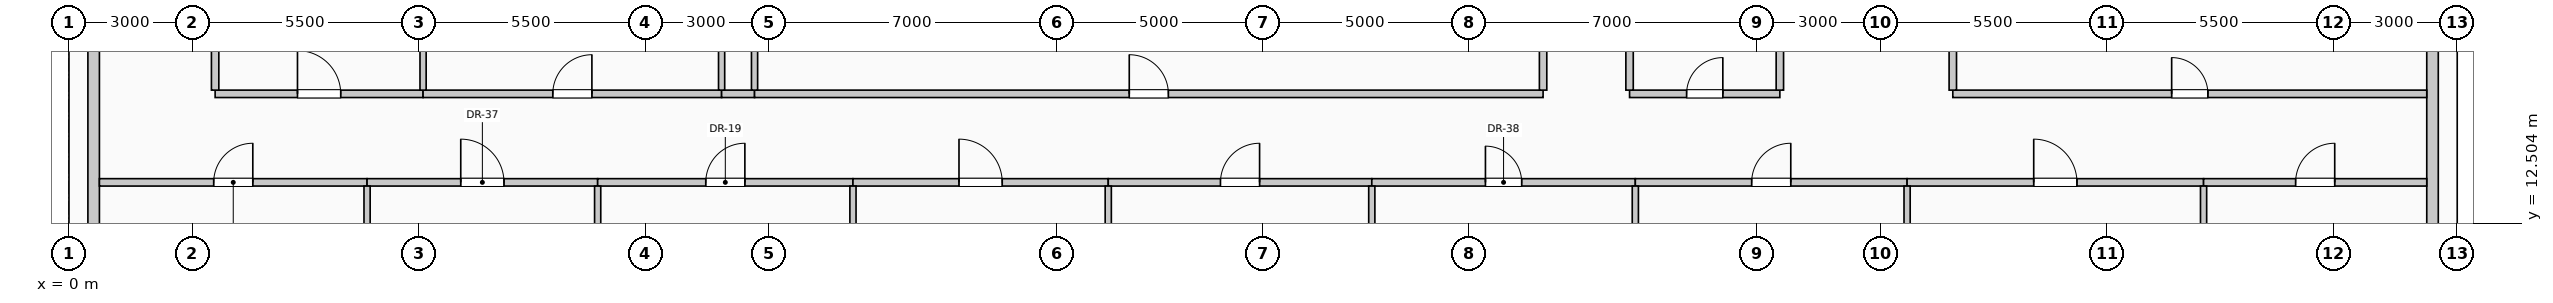
"""IFC4 building model, lengths in metres.
Left out: names, types, materials, properties, quantities, classifications, styles, units other than length and angle.
Written with IfcOpenShell. Run it as: python <this file> out.ifc"""

import sys

from ifc_helpers import new_model, si_unit, direction, frame, frame_2d, origin, place, context, subcontext, project, spatial, rectangle, extrude, element, fill, save


model = new_model("IFC4")
c1 = context("Model", 3, precision=1e-05, world=origin(), true_north=direction((0.0, 1.0)))
c2 = subcontext(c1, "Body", "Model", "MODEL_VIEW")
j1 = project(units=[si_unit("LENGTHUNIT", "METRE"), si_unit("PLANEANGLEUNIT", "RADIAN")], contexts=[c1])
p1 = place(None, origin())
s1 = spatial("IfcSite", under=j1, at=p1, CompositionType="ELEMENT")
p2 = place(p1, origin())
s2 = spatial("IfcBuilding", under=s1, at=p2, CompositionType="ELEMENT")
p3 = place(p2, frame((0.0, 0.0, 148.6)))
s3 = spatial("IfcBuildingStorey", under=s2, at=p3, CompositionType="ELEMENT", Elevation=148.6)
for number, where, z_axis, x_axis in (
    (1, (0.6, 10.445, 0.0), (0.0, 0.0, 1.0), (0.0, 1.0, 0.0)),
    (2, (57.4, 17.555, 0.0), (0.0, 0.0, 1.0), (0.0, -1.0, 0.0)),
):
    element("IfcWall", number, at=place(p3, frame(where, z_axis=z_axis, x_axis=x_axis)), inside=s3, PredefinedType="SOLIDWALL", context=c2, shape_type="SweptSolid", body=[
        extrude(rectangle(XDim=7.11, YDim=0.28, at=frame_2d((3.555, 0.0))), origin(), (0.0, 0.0, 1.0), 2.875),
    ])
p4 = place(p3, frame((0.74, 13.5, 0.0), z_axis=(0.0, 0.0, 1.0), x_axis=(1.0, 0.0, 0.0)))
e3 = element("IfcWall", 3, at=p4, inside=s3, PredefinedType="PARTITIONING", context=c2, shape_type="SweptSolid", body=[
    extrude(rectangle(XDim=6.5, YDim=0.18, at=frame_2d((3.25, 0.0))), origin(), (0.0, 0.0, 1.0), 3.725),
])
p5 = place(p4, frame((2.775, 0.0, 0.0)))
e4 = element("IfcOpeningElement", 4, at=p5, cuts=e3, PredefinedType="OPENING", context=c2, shape_type="SweptSolid", body=[
    extrude(rectangle(XDim=0.95, YDim=2.15, at=frame_2d((0.475, 1.075))), frame((0.0, 0.1, 0.0), z_axis=(0.0, -1.0, 0.0), x_axis=(1.0, 0.0, 0.0)), (0.0, 0.0, 1.0), 0.2),
])
p6 = place(p3, frame((7.24, 13.5, 0.0), z_axis=(0.0, 0.0, 1.0), x_axis=(1.0, 0.0, 0.0)))
e5 = element("IfcWall", 5, at=p6, inside=s3, PredefinedType="PARTITIONING", context=c2, shape_type="SweptSolid", body=[
    extrude(rectangle(XDim=5.6, YDim=0.18, at=frame_2d((2.8, 0.0))), origin(), (0.0, 0.0, 1.0), 3.725),
])
p7 = place(p6, frame((2.275, 0.0, 0.0)))
e6 = element("IfcOpeningElement", 6, at=p7, cuts=e5, PredefinedType="OPENING", context=c2, shape_type="SweptSolid", body=[
    extrude(rectangle(XDim=1.05, YDim=2.15, at=frame_2d((0.525, 1.075))), frame((0.0, 0.1, 0.0), z_axis=(0.0, -1.0, 0.0), x_axis=(1.0, 0.0, 0.0)), (0.0, 0.0, 1.0), 0.2),
])
p8 = place(p3, frame((12.84, 13.5, 0.0), z_axis=(0.0, 0.0, 1.0), x_axis=(1.0, 0.0, 0.0)))
e7 = element("IfcWall", 7, at=p8, inside=s3, PredefinedType="PARTITIONING", context=c2, shape_type="SweptSolid", body=[
    extrude(rectangle(XDim=6.2, YDim=0.18, at=frame_2d((3.1, 0.0))), origin(), (0.0, 0.0, 1.0), 3.725),
])
p9 = place(p8, frame((2.625, 0.0, 0.0)))
e8 = element("IfcOpeningElement", 8, at=p9, cuts=e7, PredefinedType="OPENING", context=c2, shape_type="SweptSolid", body=[
    extrude(rectangle(XDim=0.95, YDim=2.15, at=frame_2d((0.475, 1.075))), frame((0.0, 0.1, 0.0), z_axis=(0.0, -1.0, 0.0), x_axis=(1.0, 0.0, 0.0)), (0.0, 0.0, 1.0), 0.2),
])
p10 = place(p3, frame((19.04, 13.5, 0.0), z_axis=(0.0, 0.0, 1.0), x_axis=(1.0, 0.0, 0.0)))
e9 = element("IfcWall", 9, at=p10, inside=s3, PredefinedType="PARTITIONING", context=c2, shape_type="SweptSolid", body=[
    extrude(rectangle(XDim=6.2, YDim=0.18, at=frame_2d((3.1, 0.0))), origin(), (0.0, 0.0, 1.0), 3.725),
])
p11 = place(p10, frame((2.575, 0.0, 0.0)))
e10 = element("IfcOpeningElement", 10, at=p11, cuts=e9, PredefinedType="OPENING", context=c2, shape_type="SweptSolid", body=[
    extrude(rectangle(XDim=1.05, YDim=2.15, at=frame_2d((0.525, 1.075))), frame((0.0, 0.1, 0.0), z_axis=(0.0, -1.0, 0.0), x_axis=(1.0, 0.0, 0.0)), (0.0, 0.0, 1.0), 0.2),
])
p12 = place(p3, frame((25.24, 13.5, 0.0), z_axis=(0.0, 0.0, 1.0), x_axis=(1.0, 0.0, 0.0)))
e11 = element("IfcWall", 11, at=p12, inside=s3, PredefinedType="PARTITIONING", context=c2, shape_type="SweptSolid", body=[
    extrude(rectangle(XDim=6.4, YDim=0.18, at=frame_2d((3.2, 0.0))), origin(), (0.0, 0.0, 1.0), 3.725),
])
p13 = place(p12, frame((2.725, 0.0, 0.0)))
e12 = element("IfcOpeningElement", 12, at=p13, cuts=e11, PredefinedType="OPENING", context=c2, shape_type="SweptSolid", body=[
    extrude(rectangle(XDim=0.95, YDim=2.15, at=frame_2d((0.475, 1.075))), frame((0.0, 0.1, 0.0), z_axis=(0.0, -1.0, 0.0), x_axis=(1.0, 0.0, 0.0)), (0.0, 0.0, 1.0), 0.2),
])
p14 = place(p3, frame((31.64, 13.5, 0.0), z_axis=(0.0, 0.0, 1.0), x_axis=(1.0, 0.0, 0.0)))
e13 = element("IfcWall", 13, at=p14, inside=s3, PredefinedType="PARTITIONING", context=c2, shape_type="SweptSolid", body=[
    extrude(rectangle(XDim=6.4, YDim=0.18, at=frame_2d((3.2, 0.0))), origin(), (0.0, 0.0, 1.0), 3.725),
])
p15 = place(p14, frame((2.76, 0.0, 0.0)))
e14 = element("IfcOpeningElement", 14, at=p15, cuts=e13, PredefinedType="OPENING", context=c2, shape_type="SweptSolid", body=[
    extrude(rectangle(XDim=0.88, YDim=2.1, at=frame_2d((0.44, 1.05))), frame((0.0, 0.1, 0.0), z_axis=(0.0, -1.0, 0.0), x_axis=(1.0, 0.0, 0.0)), (0.0, 0.0, 1.0), 0.2),
])
p16 = place(p3, frame((38.04, 13.5, 0.0), z_axis=(0.0, 0.0, 1.0), x_axis=(1.0, 0.0, 0.0)))
e15 = element("IfcWall", 15, at=p16, inside=s3, PredefinedType="PARTITIONING", context=c2, shape_type="SweptSolid", body=[
    extrude(rectangle(XDim=6.6, YDim=0.18, at=frame_2d((3.3, 0.0))), origin(), (0.0, 0.0, 1.0), 3.725),
])
p17 = place(p16, frame((2.825, 0.0, 0.0)))
e16 = element("IfcOpeningElement", 16, at=p17, cuts=e15, PredefinedType="OPENING", context=c2, shape_type="SweptSolid", body=[
    extrude(rectangle(XDim=0.95, YDim=2.15, at=frame_2d((0.475, 1.075))), frame((0.0, 0.1, 0.0), z_axis=(0.0, -1.0, 0.0), x_axis=(1.0, 0.0, 0.0)), (0.0, 0.0, 1.0), 0.2),
])
p18 = place(p3, frame((44.64, 13.5, 0.0), z_axis=(0.0, 0.0, 1.0), x_axis=(1.0, 0.0, 0.0)))
e17 = element("IfcWall", 17, at=p18, inside=s3, PredefinedType="PARTITIONING", context=c2, shape_type="SweptSolid", body=[
    extrude(rectangle(XDim=7.2, YDim=0.18, at=frame_2d((3.6, 0.0))), origin(), (0.0, 0.0, 1.0), 3.725),
])
p19 = place(p18, frame((3.075, 0.0, 0.0)))
e18 = element("IfcOpeningElement", 18, at=p19, cuts=e17, PredefinedType="OPENING", context=c2, shape_type="SweptSolid", body=[
    extrude(rectangle(XDim=1.05, YDim=2.15, at=frame_2d((0.525, 1.075))), frame((0.0, 0.1, 0.0), z_axis=(0.0, -1.0, 0.0), x_axis=(1.0, 0.0, 0.0)), (0.0, 0.0, 1.0), 0.2),
])
p20 = place(p3, frame((51.84, 13.5, 0.0), z_axis=(0.0, 0.0, 1.0), x_axis=(1.0, 0.0, 0.0)))
e19 = element("IfcWall", 19, at=p20, inside=s3, PredefinedType="PARTITIONING", context=c2, shape_type="SweptSolid", body=[
    extrude(rectangle(XDim=5.42, YDim=0.18, at=frame_2d((2.71, 0.0))), origin(), (0.0, 0.0, 1.0), 3.725),
])
p21 = place(p20, frame((2.235, 0.0, 0.0)))
e20 = element("IfcOpeningElement", 20, at=p21, cuts=e19, PredefinedType="OPENING", context=c2, shape_type="SweptSolid", body=[
    extrude(rectangle(XDim=0.95, YDim=2.15, at=frame_2d((0.475, 1.075))), frame((0.0, 0.1, 0.0), z_axis=(0.0, -1.0, 0.0), x_axis=(1.0, 0.0, 0.0)), (0.0, 0.0, 1.0), 0.2),
])
p22 = place(p3, frame((3.55, 15.65, 0.0), z_axis=(0.0, 0.0, 1.0), x_axis=(1.0, 0.0, 0.0)))
e21 = element("IfcWall", 21, at=p22, inside=s3, PredefinedType="PARTITIONING", context=c2, shape_type="SweptSolid", body=[
    extrude(rectangle(XDim=5.05, YDim=0.18, at=frame_2d((2.525, 0.0))), origin(), (0.0, 0.0, 1.0), 3.725),
])
p23 = place(p22, frame((2.0, 0.0, 0.0)))
e22 = element("IfcOpeningElement", 22, at=p23, cuts=e21, PredefinedType="OPENING", context=c2, shape_type="SweptSolid", body=[
    extrude(rectangle(XDim=1.05, YDim=2.15, at=frame_2d((0.525, 1.075))), frame((0.0, 0.1, 0.0), z_axis=(0.0, -1.0, 0.0), x_axis=(1.0, 0.0, 0.0)), (0.0, 0.0, 1.0), 0.2),
])
p24 = place(p3, frame((8.6, 15.65, 0.0), z_axis=(0.0, 0.0, 1.0), x_axis=(1.0, 0.0, 0.0)))
e23 = element("IfcWall", 23, at=p24, inside=s3, PredefinedType="PARTITIONING", context=c2, shape_type="SweptSolid", body=[
    extrude(rectangle(XDim=7.25, YDim=0.18, at=frame_2d((3.625, 0.0))), origin(), (0.0, 0.0, 1.0), 3.725),
])
p25 = place(p24, frame((3.15, 0.0, 0.0)))
e24 = element("IfcOpeningElement", 24, at=p25, cuts=e23, PredefinedType="OPENING", context=c2, shape_type="SweptSolid", body=[
    extrude(rectangle(XDim=0.95, YDim=2.15, at=frame_2d((0.475, 1.075))), frame((0.0, 0.1, 0.0), z_axis=(0.0, -1.0, 0.0), x_axis=(1.0, 0.0, 0.0)), (0.0, 0.0, 1.0), 0.2),
])
p26 = place(p3, frame((15.85, 15.65, 0.0), z_axis=(0.0, 0.0, 1.0), x_axis=(1.0, 0.0, 0.0)))
e25 = element("IfcWall", 25, at=p26, inside=s3, PredefinedType="PARTITIONING", context=c2, shape_type="SweptSolid", body=[
    extrude(rectangle(XDim=0.8, YDim=0.18, at=frame_2d((0.4, 0.0))), origin(), (0.0, 0.0, 1.0), 3.725),
])
p27 = place(p3, frame((16.65, 15.65, 0.0), z_axis=(0.0, 0.0, 1.0), x_axis=(1.0, 0.0, 0.0)))
e26 = element("IfcWall", 26, at=p27, inside=s3, PredefinedType="PARTITIONING", context=c2, shape_type="SweptSolid", body=[
    extrude(rectangle(XDim=19.15, YDim=0.18, at=frame_2d((9.575, 0.0))), origin(), (0.0, 0.0, 1.0), 3.725),
])
p28 = place(p27, frame((9.1, 0.0, 0.0)))
e27 = element("IfcOpeningElement", 27, at=p28, cuts=e26, PredefinedType="OPENING", context=c2, shape_type="SweptSolid", body=[
    extrude(rectangle(XDim=0.95, YDim=2.15, at=frame_2d((0.475, 1.075))), frame((0.0, 0.1, 0.0), z_axis=(0.0, -1.0, 0.0), x_axis=(1.0, 0.0, 0.0)), (0.0, 0.0, 1.0), 0.2),
])
p29 = place(p3, frame((37.9, 15.65, 0.0), z_axis=(0.0, 0.0, 1.0), x_axis=(1.0, 0.0, 0.0)))
e28 = element("IfcWall", 28, at=p29, inside=s3, PredefinedType="PARTITIONING", context=c2, shape_type="SweptSolid", body=[
    extrude(rectangle(XDim=3.65, YDim=0.18, at=frame_2d((1.825, 0.0))), origin(), (0.0, 0.0, 1.0), 3.725),
])
p30 = place(p29, frame((1.385, 0.0, 0.0)))
e29 = element("IfcOpeningElement", 29, at=p30, cuts=e28, PredefinedType="OPENING", context=c2, shape_type="SweptSolid", body=[
    extrude(rectangle(XDim=0.88, YDim=2.1, at=frame_2d((0.44, 1.05))), frame((0.0, 0.1, 0.0), z_axis=(0.0, -1.0, 0.0), x_axis=(1.0, 0.0, 0.0)), (0.0, 0.0, 1.0), 0.2),
])
p31 = place(p3, frame((45.75, 15.65, 0.0), z_axis=(0.0, 0.0, 1.0), x_axis=(1.0, 0.0, 0.0)))
e30 = element("IfcWall", 30, at=p31, inside=s3, PredefinedType="PARTITIONING", context=c2, shape_type="SweptSolid", body=[
    extrude(rectangle(XDim=11.51, YDim=0.18, at=frame_2d((5.755, 0.0))), origin(), (0.0, 0.0, 1.0), 3.725),
])
p32 = place(p31, frame((5.315, 0.0, 0.0)))
e31 = element("IfcOpeningElement", 31, at=p32, cuts=e30, PredefinedType="OPENING", context=c2, shape_type="SweptSolid", body=[
    extrude(rectangle(XDim=0.88, YDim=2.1, at=frame_2d((0.44, 1.05))), frame((0.0, 0.1, 0.0), z_axis=(0.0, -1.0, 0.0), x_axis=(1.0, 0.0, 0.0)), (0.0, 0.0, 1.0), 0.2),
])
p33 = place(p3, frame((3.55, 15.74, 0.0), z_axis=(0.0, 0.0, 1.0), x_axis=(0.0, 1.0, 0.0)))
e32 = element("IfcWall", 32, at=p33, inside=s3, PredefinedType="PARTITIONING", context=c2, shape_type="SweptSolid", body=[
    extrude(rectangle(XDim=3.135, YDim=0.18, at=frame_2d((1.567, 0.0))), origin(), (0.0, 0.0, 1.0), 3.725),
])
p34 = place(p3, frame((7.24, 0.74, 0.0), z_axis=(0.0, 0.0, 1.0), x_axis=(0.0, 1.0, 0.0)))
e33 = element("IfcWall", 33, at=p34, inside=s3, PredefinedType="PARTITIONING", context=c2, shape_type="SweptSolid", body=[
    extrude(rectangle(XDim=12.67, YDim=0.15, at=frame_2d((6.335, 0.0))), origin(), (0.0, 0.0, 1.0), 3.725),
])
p35 = place(p3, frame((8.6, 15.74, 0.0), z_axis=(0.0, 0.0, 1.0), x_axis=(0.0, 1.0, 0.0)))
e34 = element("IfcWall", 34, at=p35, inside=s3, PredefinedType="PARTITIONING", context=c2, shape_type="SweptSolid", body=[
    extrude(rectangle(XDim=3.135, YDim=0.15, at=frame_2d((1.567, 0.0))), origin(), (0.0, 0.0, 1.0), 3.725),
])
p36 = place(p3, frame((12.84, 0.74, 0.0), z_axis=(0.0, 0.0, 1.0), x_axis=(0.0, 1.0, 0.0)))
e35 = element("IfcWall", 35, at=p36, inside=s3, PredefinedType="PARTITIONING", context=c2, shape_type="SweptSolid", body=[
    extrude(rectangle(XDim=12.67, YDim=0.15, at=frame_2d((6.335, 0.0))), origin(), (0.0, 0.0, 1.0), 3.725),
])
p37 = place(p3, frame((15.85, 15.74, 0.0), z_axis=(0.0, 0.0, 1.0), x_axis=(0.0, 1.0, 0.0)))
e36 = element("IfcWall", 36, at=p37, inside=s3, PredefinedType="PARTITIONING", context=c2, shape_type="SweptSolid", body=[
    extrude(rectangle(XDim=1.76, YDim=0.15, at=frame_2d((0.88, 0.0))), origin(), (0.0, 0.0, 1.0), 3.725),
])
p38 = place(p3, frame((16.65, 15.74, 0.0), z_axis=(0.0, 0.0, 1.0), x_axis=(0.0, 1.0, 0.0)))
e37 = element("IfcWall", 37, at=p38, inside=s3, PredefinedType="PARTITIONING", context=c2, shape_type="SweptSolid", body=[
    extrude(rectangle(XDim=1.76, YDim=0.15, at=frame_2d((0.88, 0.0))), origin(), (0.0, 0.0, 1.0), 3.07),
])
for number, where, z_axis, x_axis in (
    (38, (19.04, 0.74, 0.0), (0.0, 0.0, 1.0), (0.0, 1.0, 0.0)),
    (39, (25.24, 0.74, 0.0), (0.0, 0.0, 1.0), (0.0, 1.0, 0.0)),
    (40, (31.64, 0.74, 0.0), (0.0, 0.0, 1.0), (0.0, 1.0, 0.0)),
):
    element("IfcWall", number, at=place(p3, frame(where, z_axis=z_axis, x_axis=x_axis)), inside=s3, PredefinedType="PARTITIONING", context=c2, shape_type="SweptSolid", body=[
        extrude(rectangle(XDim=12.67, YDim=0.15, at=frame_2d((6.335, 0.0))), origin(), (0.0, 0.0, 1.0), 3.725),
    ])
p39 = place(p3, frame((35.8, 15.74, 0.0), z_axis=(0.0, 0.0, 1.0), x_axis=(0.0, 1.0, 0.0)))
e41 = element("IfcWall", 41, at=p39, inside=s3, PredefinedType="PARTITIONING", context=c2, shape_type="SweptSolid", body=[
    extrude(rectangle(XDim=9.185, YDim=0.18, at=frame_2d((4.593, 0.0))), origin(), (0.0, 0.0, 1.0), 3.725),
])
p40 = place(p3, frame((37.9, 15.74, 0.0), z_axis=(0.0, 0.0, 1.0), x_axis=(0.0, 1.0, 0.0)))
e42 = element("IfcWall", 42, at=p40, inside=s3, PredefinedType="PARTITIONING", context=c2, shape_type="SweptSolid", body=[
    extrude(rectangle(XDim=11.17, YDim=0.18, at=frame_2d((5.585, 0.0))), origin(), (0.0, 0.0, 1.0), 3.725),
])
p41 = place(p3, frame((38.04, 0.74, 0.0), z_axis=(0.0, 0.0, 1.0), x_axis=(0.0, 1.0, 0.0)))
e43 = element("IfcWall", 43, at=p41, inside=s3, PredefinedType="PARTITIONING", context=c2, shape_type="SweptSolid", body=[
    extrude(rectangle(XDim=12.67, YDim=0.15, at=frame_2d((6.335, 0.0))), origin(), (0.0, 0.0, 1.0), 3.725),
])
p42 = place(p3, frame((41.55, 15.74, 0.0), z_axis=(0.0, 0.0, 1.0), x_axis=(0.0, 1.0, 0.0)))
e44 = element("IfcWall", 44, at=p42, inside=s3, PredefinedType="PARTITIONING", context=c2, shape_type="SweptSolid", body=[
    extrude(rectangle(XDim=1.76, YDim=0.18, at=frame_2d((0.88, 0.0))), origin(), (0.0, 0.0, 1.0), 3.07),
])
p43 = place(p3, frame((44.64, 0.74, 0.0), z_axis=(0.0, 0.0, 1.0), x_axis=(0.0, 1.0, 0.0)))
e45 = element("IfcWall", 45, at=p43, inside=s3, PredefinedType="PARTITIONING", context=c2, shape_type="SweptSolid", body=[
    extrude(rectangle(XDim=12.67, YDim=0.15, at=frame_2d((6.335, 0.0))), origin(), (0.0, 0.0, 1.0), 3.725),
])
p44 = place(p3, frame((45.75, 15.74, 0.0), z_axis=(0.0, 0.0, 1.0), x_axis=(0.0, 1.0, 0.0)))
e46 = element("IfcWall", 46, at=p44, inside=s3, PredefinedType="PARTITIONING", context=c2, shape_type="SweptSolid", body=[
    extrude(rectangle(XDim=7.035, YDim=0.18, at=frame_2d((3.518, 0.0))), origin(), (0.0, 0.0, 1.0), 3.725),
])
p45 = place(p3, frame((51.84, 0.74, 0.0), z_axis=(0.0, 0.0, 1.0), x_axis=(0.0, 1.0, 0.0)))
e47 = element("IfcWall", 47, at=p45, inside=s3, PredefinedType="PARTITIONING", context=c2, shape_type="SweptSolid", body=[
    extrude(rectangle(XDim=12.67, YDim=0.15, at=frame_2d((6.335, 0.0))), origin(), (0.0, 0.0, 1.0), 3.725),
])
p46 = place(p5, origin())
e48 = element("IfcDoor", 48, at=p46, inside=s3, OperationType="SINGLE_SWING_RIGHT", PredefinedType="DOOR", context=c2, shape_type="SweptSolid", body=[
    extrude(rectangle(XDim=0.95, YDim=2.15, at=frame_2d((0.475, 1.075))), frame((0.0, 0.025, 0.0), z_axis=(0.0, -1.0, 0.0), x_axis=(1.0, 0.0, 0.0)), (0.0, 0.0, 1.0), 0.05),
])
fill(e4, e48)
p47 = place(p7, origin())
e49 = element("IfcDoor", 49, at=p47, inside=s3, OperationType="SINGLE_SWING_LEFT", PredefinedType="DOOR", context=c2, shape_type="SweptSolid", body=[
    extrude(rectangle(XDim=1.05, YDim=2.15, at=frame_2d((0.525, 1.075))), frame((0.0, 0.025, 0.0), z_axis=(0.0, -1.0, 0.0), x_axis=(1.0, 0.0, 0.0)), (0.0, 0.0, 1.0), 0.05),
])
fill(e6, e49)
p48 = place(p9, origin())
e50 = element("IfcDoor", 50, at=p48, inside=s3, OperationType="SINGLE_SWING_RIGHT", PredefinedType="DOOR", context=c2, shape_type="SweptSolid", body=[
    extrude(rectangle(XDim=0.95, YDim=2.15, at=frame_2d((0.475, 1.075))), frame((0.0, 0.025, 0.0), z_axis=(0.0, -1.0, 0.0), x_axis=(1.0, 0.0, 0.0)), (0.0, 0.0, 1.0), 0.05),
])
fill(e8, e50)
p49 = place(p11, origin())
e51 = element("IfcDoor", 51, at=p49, inside=s3, OperationType="SINGLE_SWING_LEFT", PredefinedType="DOOR", context=c2, shape_type="SweptSolid", body=[
    extrude(rectangle(XDim=1.05, YDim=2.15, at=frame_2d((0.525, 1.075))), frame((0.0, 0.025, 0.0), z_axis=(0.0, -1.0, 0.0), x_axis=(1.0, 0.0, 0.0)), (0.0, 0.0, 1.0), 0.05),
])
fill(e10, e51)
p50 = place(p13, origin())
e52 = element("IfcDoor", 52, at=p50, inside=s3, OperationType="SINGLE_SWING_RIGHT", PredefinedType="DOOR", context=c2, shape_type="SweptSolid", body=[
    extrude(rectangle(XDim=0.95, YDim=2.15, at=frame_2d((0.475, 1.075))), frame((0.0, 0.025, 0.0), z_axis=(0.0, -1.0, 0.0), x_axis=(1.0, 0.0, 0.0)), (0.0, 0.0, 1.0), 0.05),
])
fill(e12, e52)
p51 = place(p15, origin())
e53 = element("IfcDoor", 53, at=p51, inside=s3, OperationType="SINGLE_SWING_LEFT", PredefinedType="DOOR", context=c2, shape_type="SweptSolid", body=[
    extrude(rectangle(XDim=0.88, YDim=2.1, at=frame_2d((0.44, 1.05))), frame((0.0, 0.025, 0.0), z_axis=(0.0, -1.0, 0.0), x_axis=(1.0, 0.0, 0.0)), (0.0, 0.0, 1.0), 0.05),
])
fill(e14, e53)
p52 = place(p17, origin())
e54 = element("IfcDoor", 54, at=p52, inside=s3, OperationType="SINGLE_SWING_RIGHT", PredefinedType="DOOR", context=c2, shape_type="SweptSolid", body=[
    extrude(rectangle(XDim=0.95, YDim=2.15, at=frame_2d((0.475, 1.075))), frame((0.0, 0.025, 0.0), z_axis=(0.0, -1.0, 0.0), x_axis=(1.0, 0.0, 0.0)), (0.0, 0.0, 1.0), 0.05),
])
fill(e16, e54)
p53 = place(p19, origin())
e55 = element("IfcDoor", 55, at=p53, inside=s3, OperationType="SINGLE_SWING_LEFT", PredefinedType="DOOR", context=c2, shape_type="SweptSolid", body=[
    extrude(rectangle(XDim=1.05, YDim=2.15, at=frame_2d((0.525, 1.075))), frame((0.0, 0.025, 0.0), z_axis=(0.0, -1.0, 0.0), x_axis=(1.0, 0.0, 0.0)), (0.0, 0.0, 1.0), 0.05),
])
fill(e18, e55)
p54 = place(p21, origin())
e56 = element("IfcDoor", 56, at=p54, inside=s3, OperationType="SINGLE_SWING_RIGHT", PredefinedType="DOOR", context=c2, shape_type="SweptSolid", body=[
    extrude(rectangle(XDim=0.95, YDim=2.15, at=frame_2d((0.475, 1.075))), frame((0.0, 0.025, 0.0), z_axis=(0.0, -1.0, 0.0), x_axis=(1.0, 0.0, 0.0)), (0.0, 0.0, 1.0), 0.05),
])
fill(e20, e56)
p55 = place(p23, origin())
e57 = element("IfcDoor", 57, at=p55, inside=s3, OperationType="SINGLE_SWING_LEFT", PredefinedType="DOOR", context=c2, shape_type="SweptSolid", body=[
    extrude(rectangle(XDim=1.05, YDim=2.15, at=frame_2d((0.525, 1.075))), frame((0.0, 0.025, 0.0), z_axis=(0.0, -1.0, 0.0), x_axis=(1.0, 0.0, 0.0)), (0.0, 0.0, 1.0), 0.05),
])
fill(e22, e57)
p56 = place(p25, origin())
e58 = element("IfcDoor", 58, at=p56, inside=s3, OperationType="SINGLE_SWING_RIGHT", PredefinedType="DOOR", context=c2, shape_type="SweptSolid", body=[
    extrude(rectangle(XDim=0.95, YDim=2.15, at=frame_2d((0.475, 1.075))), frame((0.0, 0.025, 0.0), z_axis=(0.0, -1.0, 0.0), x_axis=(1.0, 0.0, 0.0)), (0.0, 0.0, 1.0), 0.05),
])
fill(e24, e58)
p57 = place(p28, origin())
e59 = element("IfcDoor", 59, at=p57, inside=s3, OperationType="SINGLE_SWING_LEFT", PredefinedType="DOOR", context=c2, shape_type="SweptSolid", body=[
    extrude(rectangle(XDim=0.95, YDim=2.15, at=frame_2d((0.475, 1.075))), frame((0.0, 0.025, 0.0), z_axis=(0.0, -1.0, 0.0), x_axis=(1.0, 0.0, 0.0)), (0.0, 0.0, 1.0), 0.05),
])
fill(e27, e59)
p58 = place(p30, origin())
e60 = element("IfcDoor", 60, at=p58, inside=s3, OperationType="SINGLE_SWING_RIGHT", PredefinedType="DOOR", context=c2, shape_type="SweptSolid", body=[
    extrude(rectangle(XDim=0.88, YDim=2.1, at=frame_2d((0.44, 1.05))), frame((0.0, 0.025, 0.0), z_axis=(0.0, -1.0, 0.0), x_axis=(1.0, 0.0, 0.0)), (0.0, 0.0, 1.0), 0.05),
])
fill(e29, e60)
p59 = place(p32, origin())
e61 = element("IfcDoor", 61, at=p59, inside=s3, OperationType="SINGLE_SWING_LEFT", PredefinedType="DOOR", context=c2, shape_type="SweptSolid", body=[
    extrude(rectangle(XDim=0.88, YDim=2.1, at=frame_2d((0.44, 1.05))), frame((0.0, 0.025, 0.0), z_axis=(0.0, -1.0, 0.0), x_axis=(1.0, 0.0, 0.0)), (0.0, 0.0, 1.0), 0.05),
])
fill(e31, e61)
save(model, sys.argv[1])
